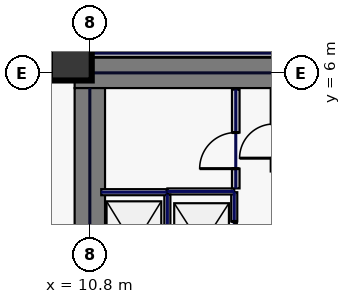
"""IFC4 building model, lengths in metres.
Left out: names, types, materials, properties, quantities, classifications, styles, units other than length and angle.
Written with IfcOpenShell. Run it as: python <this file> out.ifc"""

import sys

from ifc_helpers import new_model, si_unit, direction, frame, frame_2d, origin, origin_2d, place, context, subcontext, project, spatial, rectangle, extrude, element, fill, save


model = new_model("IFC4")
c1 = context("Model", 3, precision=1e-05, world=origin(), true_north=direction((0.0, 1.0)))
c2 = subcontext(c1, "Body", "Model", "MODEL_VIEW")
j1 = project(units=[si_unit("LENGTHUNIT", "METRE"), si_unit("PLANEANGLEUNIT", "RADIAN")], contexts=[c1])
p1 = place(None, origin())
s1 = spatial("IfcSite", under=j1, at=p1, CompositionType="ELEMENT")
p2 = place(p1, origin())
s2 = spatial("IfcBuilding", under=s1, at=p2, CompositionType="ELEMENT")
p3 = place(p2, frame((0.0, 0.0, -10.2)))
s3 = spatial("IfcBuildingStorey", under=s2, at=p3, CompositionType="ELEMENT", Elevation=-10.2)
p4 = place(p3, frame((10.4, 6.0, 0.0), z_axis=(0.0, 0.0, 1.0), x_axis=(1.0, 0.0, 0.0)))
e1 = element("IfcWall", 1, at=p4, inside=s3, PredefinedType="SHEAR", context=c2, shape_type="SweptSolid", body=[
    extrude(rectangle(XDim=11.6, YDim=0.8, at=frame_2d((5.8, 0.0))), origin(), (0.0, 0.0, 1.0), 4.45),
])
p5 = place(p3, frame((10.8, 0.05, 0.0), z_axis=(0.0, 0.0, 1.0), x_axis=(0.0, 1.0, 0.0)))
e2 = element("IfcWall", 2, at=p5, inside=s3, PredefinedType="SHEAR", context=c2, shape_type="SweptSolid", body=[
    extrude(rectangle(XDim=5.55, YDim=0.8, at=frame_2d((2.775, 0.0))), origin(), (0.0, 0.0, 1.0), 4.45),
])
p6 = place(p3, frame((10.3, 6.35, 0.0), z_axis=(0.0, 0.0, 1.0), x_axis=(1.0, 0.0, 0.0)))
e3 = element("IfcColumn", 3, at=p6, inside=s3, PredefinedType="COLUMN", context=c2, shape_type="SweptSolid", body=[
    extrude(rectangle(XDim=1.1, YDim=1.1, at=origin_2d()), origin(), (0.0, 0.0, 1.0), 4.45),
])
p7 = place(p3, frame((14.6, 0.12, 0.0), z_axis=(0.0, 0.0, 1.0), x_axis=(0.0, 1.0, 0.0)))
e4 = element("IfcWall", 4, at=p7, inside=s3, PredefinedType="PARTITIONING", context=c2, shape_type="SweptSolid", body=[
    extrude(rectangle(XDim=2.74, YDim=0.16, at=frame_2d((1.37, 0.0))), origin(), (0.0, 0.0, 1.0), 4.45),
])
p8 = place(p7, frame((0.77, 0.0, 0.0)))
e5 = element("IfcOpeningElement", 5, at=p8, cuts=e4, PredefinedType="OPENING", context=c2, shape_type="SweptSolid", body=[
    extrude(rectangle(XDim=1.2, YDim=2.2, at=frame_2d((0.6, 1.1))), frame((0.0, 0.09, 0.0), z_axis=(0.0, -1.0, 0.0), x_axis=(1.0, 0.0, 0.0)), (0.0, 0.0, 1.0), 0.18),
])
p9 = place(p3, frame((12.84, 2.88, 0.0), z_axis=(0.0, 0.0, 1.0), x_axis=(1.0, 0.0, 0.0)))
e6 = element("IfcWall", 6, at=p9, inside=s3, PredefinedType="PARTITIONING", context=c2, shape_type="SweptSolid", body=[
    extrude(rectangle(XDim=1.76, YDim=0.16, at=frame_2d((0.88, 0.0))), origin(), (0.0, 0.0, 1.0), 4.45),
])
p10 = place(p3, frame((12.84, 0.18, 0.0), z_axis=(0.0, 0.0, 1.0), x_axis=(0.0, 1.0, 0.0)))
e7 = element("IfcWall", 7, at=p10, inside=s3, PredefinedType="PARTITIONING", context=c2, shape_type="SweptSolid", body=[
    extrude(rectangle(XDim=2.62, YDim=0.16, at=frame_2d((1.31, 0.0))), origin(), (0.0, 0.0, 1.0), 4.45),
])
p11 = place(p3, frame((11.1, 2.86, 0.0), z_axis=(0.0, 0.0, 1.0), x_axis=(1.0, 0.0, 0.0)))
e8 = element("IfcWall", 8, at=p11, inside=s3, PredefinedType="PARTITIONING", context=c2, shape_type="SweptSolid", body=[
    extrude(rectangle(XDim=1.72, YDim=0.16, at=frame_2d((0.86, 0.0))), origin(), (0.0, 0.0, 1.0), 4.45),
])
p12 = place(p3, frame((15.64, 3.405, 0.0), z_axis=(0.0, 0.0, 1.0), x_axis=(0.0, 1.0, 0.0)))
e9 = element("IfcWall", 9, at=p12, inside=s3, PredefinedType="PARTITIONING", context=c2, shape_type="SweptSolid", body=[
    extrude(rectangle(XDim=2.155, YDim=0.16, at=frame_2d((1.078, 0.0))), origin(), (0.0, 0.0, 1.0), 4.45),
])
p13 = place(p12, frame((0.35, 0.0, 0.0)))
e10 = element("IfcOpeningElement", 10, at=p13, cuts=e9, PredefinedType="OPENING", context=c2, shape_type="SweptSolid", body=[
    extrude(rectangle(XDim=0.9, YDim=2.2, at=frame_2d((0.45, 1.1))), frame((0.0, 0.09, 0.0), z_axis=(0.0, -1.0, 0.0), x_axis=(1.0, 0.0, 0.0)), (0.0, 0.0, 1.0), 0.18),
])
p14 = place(p3, frame((14.64, 2.96, 0.0), z_axis=(0.0, 0.0, 1.0), x_axis=(0.0, 1.0, 0.0)))
e11 = element("IfcWall", 11, at=p14, inside=s3, PredefinedType="SOLIDWALL", context=c2, shape_type="SweptSolid", body=[
    extrude(rectangle(XDim=2.6, YDim=0.2, at=frame_2d((1.3, 0.0))), origin(), (0.0, 0.0, 1.0), 4.45),
])
p15 = place(p14, frame((0.52, 0.0, 0.0)))
e12 = element("IfcOpeningElement", 12, at=p15, cuts=e11, PredefinedType="OPENING", context=c2, shape_type="SweptSolid", body=[
    extrude(rectangle(XDim=0.95, YDim=2.2, at=frame_2d((0.475, 1.1))), frame((0.0, 0.11, 0.0), z_axis=(0.0, -1.0, 0.0), x_axis=(1.0, 0.0, 0.0)), (0.0, 0.0, 1.0), 0.22),
])
p16 = place(p3, frame((25.615, 6.52, 0.0), z_axis=(0.0, 0.0, 1.0), x_axis=(-1.0, 0.0, 0.0)))
e13 = element("IfcWall", 13, at=p16, inside=s3, PredefinedType="SOLIDWALL", context=c2, shape_type="SweptSolid", body=[
    extrude(rectangle(XDim=15.235, YDim=0.2, at=frame_2d((7.618, 0.0))), origin(), (0.0, 0.0, 1.0), 4.45),
])
p17 = place(p8, origin())
e14 = element("IfcDoor", 14, at=p17, inside=s3, OperationType="SLIDING_TO_LEFT", PredefinedType="DOOR", context=c2, shape_type="SweptSolid", body=[
    extrude(rectangle(XDim=1.2, YDim=2.2, at=frame_2d((0.6, 1.1))), frame((0.0, 0.025, 0.0), z_axis=(0.0, -1.0, 0.0), x_axis=(1.0, 0.0, 0.0)), (0.0, 0.0, 1.0), 0.05),
])
fill(e5, e14)
p18 = place(p15, origin())
e15 = element("IfcDoor", 15, at=p18, inside=s3, OperationType="SINGLE_SWING_LEFT", PredefinedType="DOOR", context=c2, shape_type="SweptSolid", body=[
    extrude(rectangle(XDim=0.95, YDim=2.2, at=frame_2d((0.475, 1.1))), frame((0.0, 0.025, 0.0), z_axis=(0.0, -1.0, 0.0), x_axis=(1.0, 0.0, 0.0)), (0.0, 0.0, 1.0), 0.05),
])
fill(e12, e15)
save(model, sys.argv[1])
